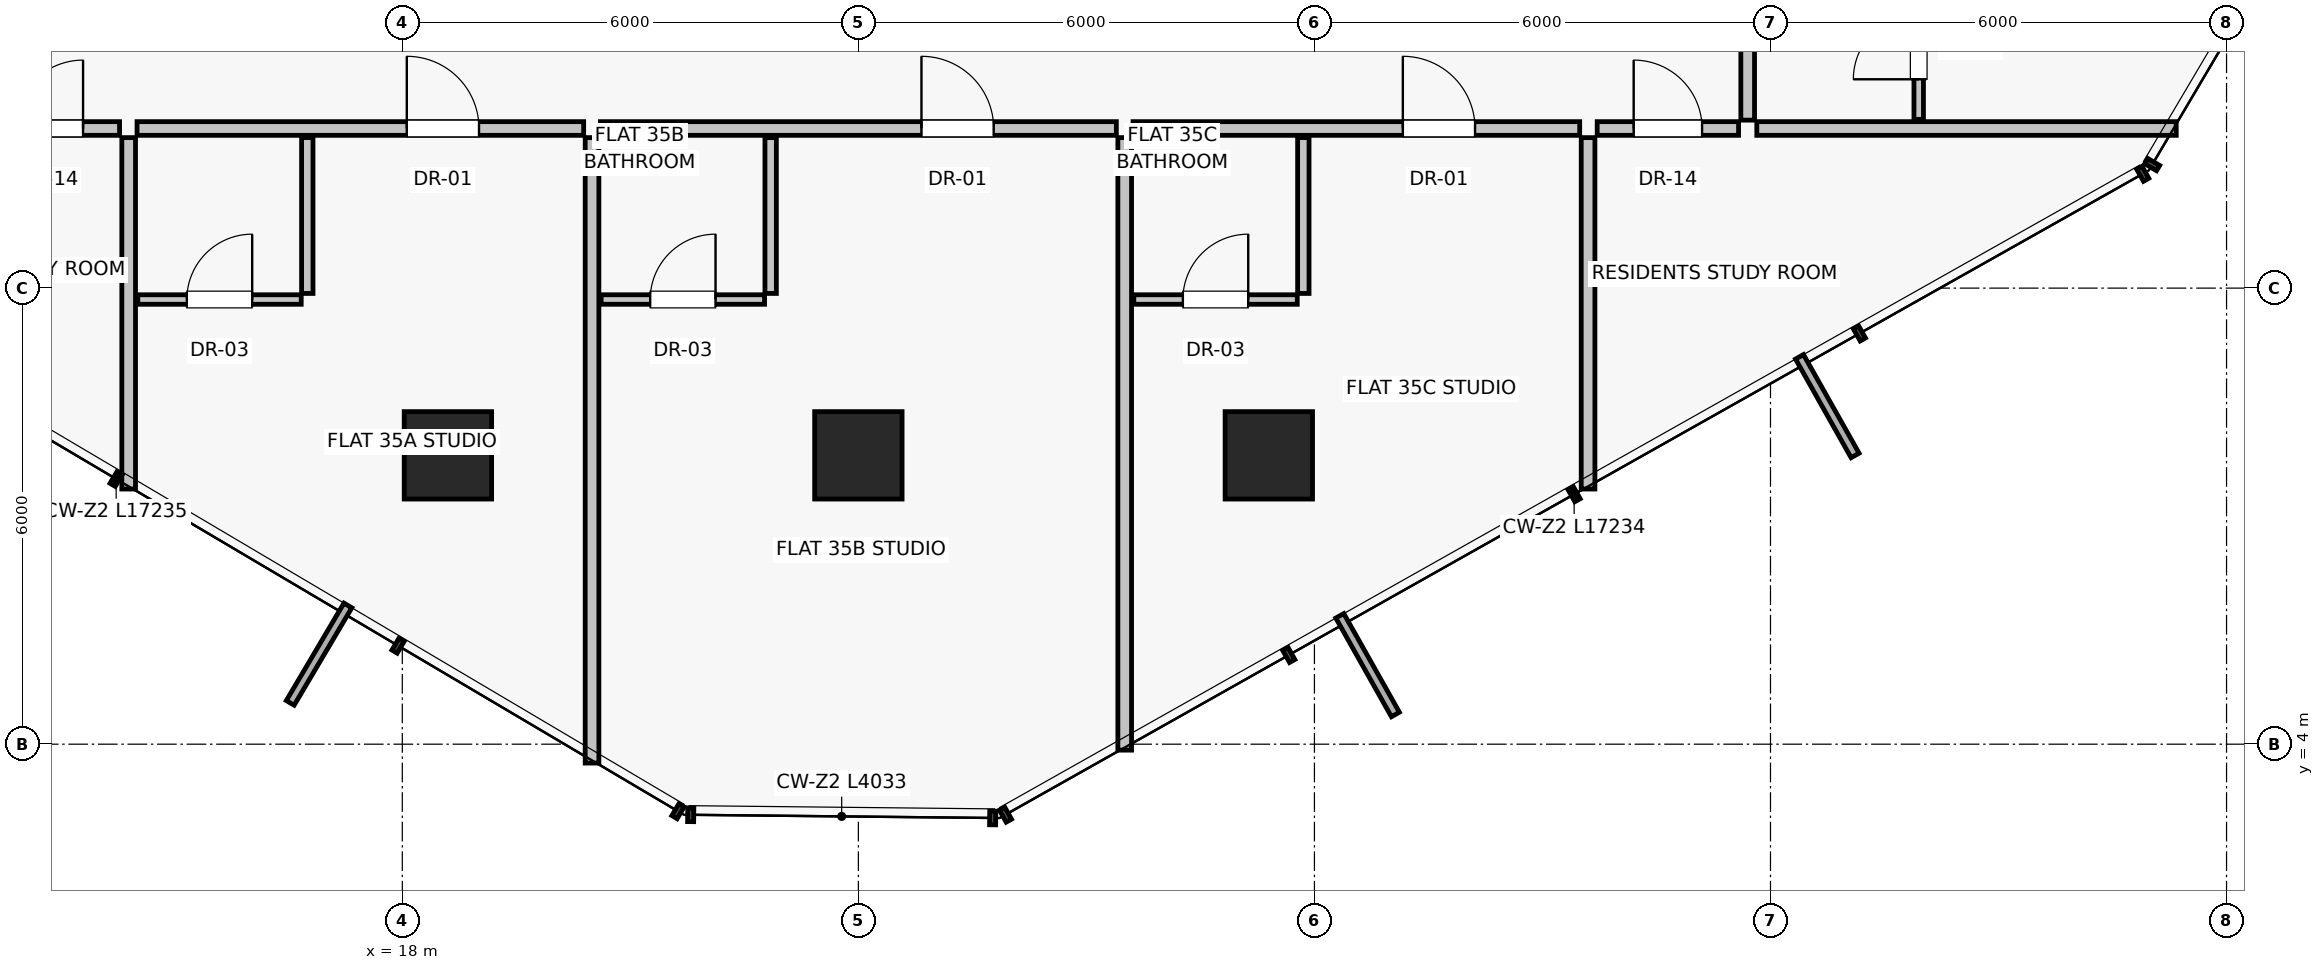
"""IFC4 building model, lengths in metres.
Left out: names, types, materials, properties, quantities, classifications, styles, units other than length and angle.
Written with IfcOpenShell. Run it as: python <this file> out.ifc"""

import sys

from ifc_helpers import new_model, si_unit, direction, frame, frame_2d, origin, origin_2d, place, context, subcontext, project, spatial, rectangle, extrude, source, transform, mapped, element, fill, save


model = new_model("IFC4")
c1 = context("Model", 3, precision=1e-05, world=origin(), true_north=direction((0.0, 1.0)))
c2 = subcontext(c1, "Body", "Model", "MODEL_VIEW")
j1 = project(units=[si_unit("LENGTHUNIT", "METRE"), si_unit("PLANEANGLEUNIT", "RADIAN")], contexts=[c1])
p1 = place(None, origin())
s1 = spatial("IfcSite", under=j1, at=p1, CompositionType="ELEMENT")
p2 = place(p1, origin())
s2 = spatial("IfcBuilding", under=s1, at=p2, CompositionType="ELEMENT")
p3 = place(p2, frame((0.0, 0.0, 126.25)))
s3 = spatial("IfcBuildingStorey", under=s2, at=p3, CompositionType="ELEMENT", Elevation=126.25)
for number, where, z_axis, x_axis in (
    (1, (18.6, 7.8, 0.0), (0.0, 0.0, 1.0), (1.0, 0.0, 0.0)),
    (2, (24.0, 7.8, 0.0), (0.0, 0.0, 1.0), (1.0, 0.0, 0.0)),
    (3, (29.4, 7.8, 0.0), (0.0, 0.0, 1.0), (1.0, 0.0, 0.0)),
):
    element("IfcColumn", number, at=place(p3, frame(where, z_axis=z_axis, x_axis=x_axis)), inside=s3, PredefinedType="COLUMN", context=c2, shape_type="SweptSolid", body=[
        extrude(rectangle(XDim=1.15, YDim=1.15, at=origin_2d()), origin(), (0.0, 0.0, 1.0), 3.25),
    ])
for number, where, z_axis, x_axis in (
    (4, (14.4, 11.98, 0.0), (0.0, 0.0, 1.0), (0.0, -1.0, 0.0)),
    (5, (33.6, 11.98, 0.0), (0.0, 0.0, 1.0), (0.0, -1.0, 0.0)),
):
    element("IfcWall", number, at=place(p3, frame(where, z_axis=z_axis, x_axis=x_axis)), inside=s3, PredefinedType="PARTITIONING", context=c2, shape_type="SweptSolid", body=[
        extrude(rectangle(XDim=4.623, YDim=0.18, at=frame_2d((2.312, 0.0))), origin(), (0.0, 0.0, 1.0), 3.0),
    ])
p4 = place(p3, frame((14.51, 12.1, 0.0), z_axis=(0.0, 0.0, 1.0), x_axis=(1.0, 0.0, 0.0)))
e6 = element("IfcWall", 6, at=p4, inside=s3, PredefinedType="PARTITIONING", context=c2, shape_type="SweptSolid", body=[
    extrude(rectangle(XDim=5.876, YDim=0.18, at=frame_2d((2.938, 0.0))), origin(), (0.0, 0.0, 1.0), 2.58),
])
p5 = place(p4, frame((3.549, 0.0, 0.0)))
e7 = element("IfcOpeningElement", 7, at=p5, cuts=e6, PredefinedType="OPENING", context=c2, shape_type="SweptSolid", body=[
    extrude(rectangle(XDim=0.95, YDim=2.02, at=frame_2d((0.475, 1.01))), frame((0.0, 0.1, 0.0), z_axis=(0.0, -1.0, 0.0), x_axis=(1.0, 0.0, 0.0)), (0.0, 0.0, 1.0), 0.2),
])
p6 = place(p3, frame((16.75, 11.98, 0.0), z_axis=(0.0, 0.0, 1.0), x_axis=(0.0, -1.0, 0.0)))
e8 = element("IfcWall", 8, at=p6, inside=s3, PredefinedType="PARTITIONING", context=c2, shape_type="SweptSolid", body=[
    extrude(rectangle(XDim=2.05, YDim=0.15, at=frame_2d((1.025, 0.0))), origin(), (0.0, 0.0, 1.0), 3.0),
])
p7 = place(p3, frame((14.52, 9.85, 0.0), z_axis=(0.0, 0.0, 1.0), x_axis=(1.0, 0.0, 0.0)))
e9 = element("IfcWall", 9, at=p7, inside=s3, PredefinedType="PARTITIONING", context=c2, shape_type="SweptSolid", body=[
    extrude(rectangle(XDim=2.15, YDim=0.125, at=frame_2d((1.075, 0.0))), origin(), (0.0, 0.0, 1.0), 3.0),
])
p8 = place(p7, frame((0.645, 0.0, 0.0)))
e10 = element("IfcOpeningElement", 10, at=p8, cuts=e9, PredefinedType="OPENING", context=c2, shape_type="SweptSolid", body=[
    extrude(rectangle(XDim=0.86, YDim=2.01, at=frame_2d((0.43, 1.005))), frame((0.0, 0.073, 0.0), z_axis=(0.0, -1.0, 0.0), x_axis=(1.0, 0.0, 0.0)), (0.0, 0.0, 1.0), 0.145),
])
p9 = place(p3, frame((20.496, 11.98, 0.0), z_axis=(0.0, 0.0, 1.0), x_axis=(0.0, -1.0, 0.0)))
e11 = element("IfcWall", 11, at=p9, inside=s3, PredefinedType="PARTITIONING", context=c2, shape_type="SweptSolid", body=[
    extrude(rectangle(XDim=8.229, YDim=0.18, at=frame_2d((4.114, 0.0))), origin(), (0.0, 0.0, 1.0), 3.0),
])
p10 = place(p3, frame((20.606, 12.1, 0.0), z_axis=(0.0, 0.0, 1.0), x_axis=(1.0, 0.0, 0.0)))
e12 = element("IfcWall", 12, at=p10, inside=s3, PredefinedType="PARTITIONING", context=c2, shape_type="SweptSolid", body=[
    extrude(rectangle(XDim=6.788, YDim=0.18, at=frame_2d((3.394, 0.0))), origin(), (0.0, 0.0, 1.0), 2.58),
])
p11 = place(p10, frame((4.224, 0.0, 0.0)))
e13 = element("IfcOpeningElement", 13, at=p11, cuts=e12, PredefinedType="OPENING", context=c2, shape_type="SweptSolid", body=[
    extrude(rectangle(XDim=0.95, YDim=2.02, at=frame_2d((0.475, 1.01))), frame((0.0, 0.1, 0.0), z_axis=(0.0, -1.0, 0.0), x_axis=(1.0, 0.0, 0.0)), (0.0, 0.0, 1.0), 0.2),
])
p12 = place(p3, frame((22.846, 11.98, 0.0), z_axis=(0.0, 0.0, 1.0), x_axis=(0.0, -1.0, 0.0)))
e14 = element("IfcWall", 14, at=p12, inside=s3, PredefinedType="PARTITIONING", context=c2, shape_type="SweptSolid", body=[
    extrude(rectangle(XDim=2.05, YDim=0.15, at=frame_2d((1.025, 0.0))), origin(), (0.0, 0.0, 1.0), 3.0),
])
p13 = place(p3, frame((20.616, 9.85, 0.0), z_axis=(0.0, 0.0, 1.0), x_axis=(1.0, 0.0, 0.0)))
e15 = element("IfcWall", 15, at=p13, inside=s3, PredefinedType="PARTITIONING", context=c2, shape_type="SweptSolid", body=[
    extrude(rectangle(XDim=2.15, YDim=0.125, at=frame_2d((1.075, 0.0))), origin(), (0.0, 0.0, 1.0), 3.0),
])
p14 = place(p13, frame((0.645, 0.0, 0.0)))
e16 = element("IfcOpeningElement", 16, at=p14, cuts=e15, PredefinedType="OPENING", context=c2, shape_type="SweptSolid", body=[
    extrude(rectangle(XDim=0.86, YDim=2.01, at=frame_2d((0.43, 1.005))), frame((0.0, 0.073, 0.0), z_axis=(0.0, -1.0, 0.0), x_axis=(1.0, 0.0, 0.0)), (0.0, 0.0, 1.0), 0.145),
])
p15 = place(p3, frame((27.504, 11.98, 0.0), z_axis=(0.0, 0.0, 1.0), x_axis=(0.0, -1.0, 0.0)))
e17 = element("IfcWall", 17, at=p15, inside=s3, PredefinedType="PARTITIONING", context=c2, shape_type="SweptSolid", body=[
    extrude(rectangle(XDim=8.058, YDim=0.18, at=frame_2d((4.029, 0.0))), origin(), (0.0, 0.0, 1.0), 3.0),
])
p16 = place(p3, frame((27.614, 12.1, 0.0), z_axis=(0.0, 0.0, 1.0), x_axis=(1.0, 0.0, 0.0)))
e18 = element("IfcWall", 18, at=p16, inside=s3, PredefinedType="PARTITIONING", context=c2, shape_type="SweptSolid", body=[
    extrude(rectangle(XDim=5.876, YDim=0.18, at=frame_2d((2.938, 0.0))), origin(), (0.0, 0.0, 1.0), 2.58),
])
p17 = place(p16, frame((3.549, 0.0, 0.0)))
e19 = element("IfcOpeningElement", 19, at=p17, cuts=e18, PredefinedType="OPENING", context=c2, shape_type="SweptSolid", body=[
    extrude(rectangle(XDim=0.95, YDim=2.02, at=frame_2d((0.475, 1.01))), frame((0.0, 0.1, 0.0), z_axis=(0.0, -1.0, 0.0), x_axis=(1.0, 0.0, 0.0)), (0.0, 0.0, 1.0), 0.2),
])
p18 = place(p3, frame((29.854, 11.98, 0.0), z_axis=(0.0, 0.0, 1.0), x_axis=(0.0, -1.0, 0.0)))
e20 = element("IfcWall", 20, at=p18, inside=s3, PredefinedType="PARTITIONING", context=c2, shape_type="SweptSolid", body=[
    extrude(rectangle(XDim=2.05, YDim=0.15, at=frame_2d((1.025, 0.0))), origin(), (0.0, 0.0, 1.0), 2.378),
])
p19 = place(p3, frame((27.624, 9.85, 0.0), z_axis=(0.0, 0.0, 1.0), x_axis=(1.0, 0.0, 0.0)))
e21 = element("IfcWall", 21, at=p19, inside=s3, PredefinedType="PARTITIONING", context=c2, shape_type="SweptSolid", body=[
    extrude(rectangle(XDim=2.15, YDim=0.125, at=frame_2d((1.075, 0.0))), origin(), (0.0, 0.0, 1.0), 3.0),
])
p20 = place(p19, frame((0.645, 0.0, 0.0)))
e22 = element("IfcOpeningElement", 22, at=p20, cuts=e21, PredefinedType="OPENING", context=c2, shape_type="SweptSolid", body=[
    extrude(rectangle(XDim=0.86, YDim=2.01, at=frame_2d((0.43, 1.005))), frame((0.0, 0.073, 0.0), z_axis=(0.0, -1.0, 0.0), x_axis=(1.0, 0.0, 0.0)), (0.0, 0.0, 1.0), 0.145),
])
p21 = place(p3, frame((35.82, 12.1, 0.0), z_axis=(0.0, 0.0, 1.0), x_axis=(1.0, 0.0, 0.0)))
e23 = element("IfcWall", 23, at=p21, inside=s3, PredefinedType="PARTITIONING", context=c2, shape_type="SweptSolid", body=[
    extrude(rectangle(XDim=5.518, YDim=0.18, at=frame_2d((2.759, 0.0))), origin(), (0.0, 0.0, 1.0), 3.0),
])
p22 = place(p3, frame((35.7, 12.21, 0.0), z_axis=(0.0, 0.0, 1.0), x_axis=(0.0, 1.0, 0.0)))
e24 = element("IfcWall", 24, at=p22, inside=s3, PredefinedType="PARTITIONING", context=c2, shape_type="SweptSolid", body=[
    extrude(rectangle(XDim=4.378, YDim=0.18, at=frame_2d((2.189, 0.0))), origin(), (0.0, 0.0, 1.0), 3.0),
])
p23 = place(p22, frame((2.441, 0.0, 0.0)))
e25 = element("IfcOpeningElement", 25, at=p23, cuts=e24, PredefinedType="OPENING", context=c2, shape_type="SweptSolid", body=[
    extrude(rectangle(XDim=0.95, YDim=2.02, at=frame_2d((0.475, 1.01))), frame((0.0, 0.1, 0.0), z_axis=(0.0, -1.0, 0.0), x_axis=(1.0, 0.0, 0.0)), (0.0, 0.0, 1.0), 0.2),
])
p24 = place(p3, frame((37.95, 12.22, 0.0), z_axis=(0.0, 0.0, 1.0), x_axis=(0.0, 1.0, 0.0)))
e26 = element("IfcWall", 26, at=p24, inside=s3, PredefinedType="PARTITIONING", context=c2, shape_type="SweptSolid", body=[
    extrude(rectangle(XDim=1.915, YDim=0.125, at=frame_2d((0.958, 0.0))), origin(), (0.0, 0.0, 1.0), 3.0),
])
p25 = place(p24, frame((0.528, 0.0, 0.0)))
e27 = element("IfcOpeningElement", 27, at=p25, cuts=e26, PredefinedType="OPENING", context=c2, shape_type="SweptSolid", body=[
    extrude(rectangle(XDim=0.86, YDim=2.01, at=frame_2d((0.43, 1.005))), frame((0.0, 0.073, 0.0), z_axis=(0.0, -1.0, 0.0), x_axis=(1.0, 0.0, 0.0)), (0.0, 0.0, 1.0), 0.145),
])
p26 = place(p3, frame((12.42, 12.1, 0.0), z_axis=(0.0, 0.0, 1.0), x_axis=(1.0, 0.0, 0.0)))
e28 = element("IfcWall", 28, at=p26, inside=s3, PredefinedType="PARTITIONING", context=c2, shape_type="SweptSolid", body=[
    extrude(rectangle(XDim=1.86, YDim=0.18, at=frame_2d((0.93, 0.0))), origin(), (0.0, 0.0, 1.0), 3.0),
])
p27 = place(p26, frame((0.48, 0.0, 0.0)))
e29 = element("IfcOpeningElement", 29, at=p27, cuts=e28, PredefinedType="OPENING", context=c2, shape_type="SweptSolid", body=[
    extrude(rectangle(XDim=0.9, YDim=2.01, at=frame_2d((0.45, 1.005))), frame((0.0, 0.1, 0.0), z_axis=(0.0, -1.0, 0.0), x_axis=(1.0, 0.0, 0.0)), (0.0, 0.0, 1.0), 0.2),
])
p28 = place(p3, frame((33.72, 12.1, 0.0), z_axis=(0.0, 0.0, 1.0), x_axis=(1.0, 0.0, 0.0)))
e30 = element("IfcWall", 30, at=p28, inside=s3, PredefinedType="PARTITIONING", context=c2, shape_type="SweptSolid", body=[
    extrude(rectangle(XDim=1.86, YDim=0.18, at=frame_2d((0.93, 0.0))), origin(), (0.0, 0.0, 1.0), 3.0),
])
p29 = place(p28, frame((0.48, 0.0, 0.0)))
e31 = element("IfcOpeningElement", 31, at=p29, cuts=e30, PredefinedType="OPENING", context=c2, shape_type="SweptSolid", body=[
    extrude(rectangle(XDim=0.9, YDim=2.01, at=frame_2d((0.45, 1.005))), frame((0.0, 0.1, 0.0), z_axis=(0.0, -1.0, 0.0), x_axis=(1.0, 0.0, 0.0)), (0.0, 0.0, 1.0), 0.2),
])
m1 = source(origin(), c2, "Body", "SweptSolid", [
    extrude(rectangle(XDim=0.95, YDim=2.02, at=frame_2d((0.475, 1.01))), frame((0.0, 0.025, 0.0), z_axis=(0.0, -1.0, 0.0), x_axis=(1.0, 0.0, 0.0)), (0.0, 0.0, 1.0), 0.05),
])
p30 = place(p5, origin())
e32 = element("IfcDoor", 32, at=p30, inside=s3, OperationType="SINGLE_SWING_LEFT", PredefinedType="DOOR", context=c2, shape_type="MappedRepresentation", body=[
    mapped(m1, transform((0.0, 0.0, 0.0), scale=1.0)),
])
fill(e7, e32)
m2 = source(origin(), c2, "Body", "SweptSolid", [
    extrude(rectangle(XDim=0.86, YDim=2.01, at=frame_2d((0.43, 1.005))), frame((0.0, 0.025, 0.0), z_axis=(0.0, -1.0, 0.0), x_axis=(1.0, 0.0, 0.0)), (0.0, 0.0, 1.0), 0.05),
])
p31 = place(p8, origin())
e33 = element("IfcDoor", 33, at=p31, inside=s3, OperationType="SINGLE_SWING_RIGHT", PredefinedType="DOOR", context=c2, shape_type="MappedRepresentation", body=[
    mapped(m2, transform((0.0, 0.0, 0.0), scale=1.0)),
])
fill(e10, e33)
p32 = place(p11, origin())
e34 = element("IfcDoor", 34, at=p32, inside=s3, OperationType="SINGLE_SWING_LEFT", PredefinedType="DOOR", context=c2, shape_type="MappedRepresentation", body=[
    mapped(m1, transform((0.0, 0.0, 0.0), scale=1.0)),
])
fill(e13, e34)
p33 = place(p14, origin())
e35 = element("IfcDoor", 35, at=p33, inside=s3, OperationType="SINGLE_SWING_RIGHT", PredefinedType="DOOR", context=c2, shape_type="MappedRepresentation", body=[
    mapped(m2, transform((0.0, 0.0, 0.0), scale=1.0)),
])
fill(e16, e35)
p34 = place(p17, origin())
e36 = element("IfcDoor", 36, at=p34, inside=s3, OperationType="SINGLE_SWING_LEFT", PredefinedType="DOOR", context=c2, shape_type="MappedRepresentation", body=[
    mapped(m1, transform((0.0, 0.0, 0.0), scale=1.0)),
])
fill(e19, e36)
p35 = place(p20, origin())
e37 = element("IfcDoor", 37, at=p35, inside=s3, OperationType="SINGLE_SWING_RIGHT", PredefinedType="DOOR", context=c2, shape_type="MappedRepresentation", body=[
    mapped(m2, transform((0.0, 0.0, 0.0), scale=1.0)),
])
fill(e22, e37)
p36 = place(p25, origin())
e38 = element("IfcDoor", 38, at=p36, inside=s3, OperationType="SINGLE_SWING_LEFT", PredefinedType="DOOR", context=c2, shape_type="MappedRepresentation", body=[
    mapped(m2, transform((0.0, 0.0, 0.0), scale=1.0)),
])
fill(e27, e38)
m3 = source(origin(), c2, "Body", "SweptSolid", [
    extrude(rectangle(XDim=0.9, YDim=2.01, at=frame_2d((0.45, 1.005))), frame((0.0, 0.025, 0.0), z_axis=(0.0, -1.0, 0.0), x_axis=(1.0, 0.0, 0.0)), (0.0, 0.0, 1.0), 0.05),
])
p37 = place(p27, origin())
e39 = element("IfcDoor", 39, at=p37, inside=s3, OperationType="SINGLE_SWING_RIGHT", PredefinedType="DOOR", context=c2, shape_type="MappedRepresentation", body=[
    mapped(m3, transform((0.0, 0.0, 0.0), scale=1.0)),
])
fill(e29, e39)
p38 = place(p29, origin())
e40 = element("IfcDoor", 40, at=p38, inside=s3, OperationType="SINGLE_SWING_LEFT", PredefinedType="DOOR", context=c2, shape_type="MappedRepresentation", body=[
    mapped(m3, transform((0.0, 0.0, 0.0), scale=1.0)),
])
fill(e31, e40)
save(model, sys.argv[1])
